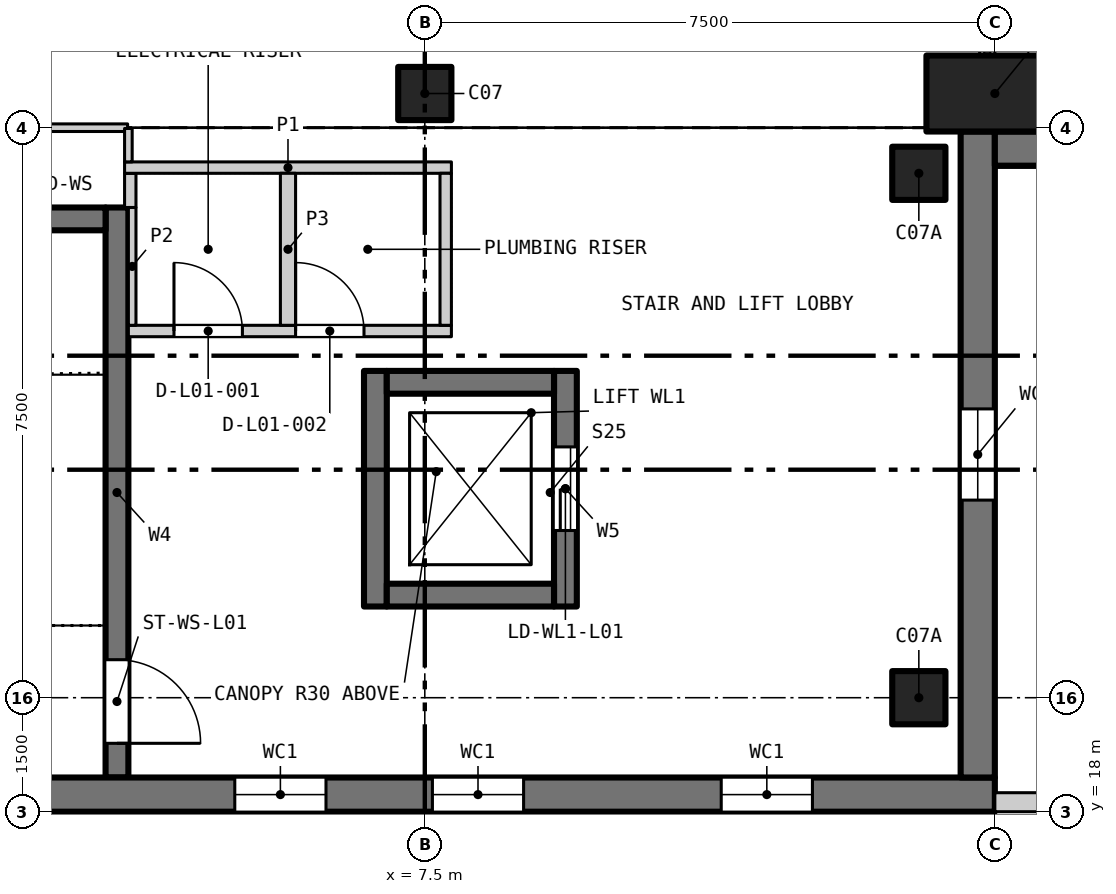
"""IFC4 building model, lengths in metres.
Left out: names, types, materials, properties, quantities, classifications, styles, units other than length and angle.
Written with IfcOpenShell. Run it as: python <this file> out.ifc"""

import sys

from ifc_helpers import new_model, si_unit, direction, frame, frame_2d, origin, origin_2d, place, context, subcontext, project, spatial, polyline, rectangle, outline, extrude, element, fill, save


model = new_model("IFC4")
c1 = context("Model", 3, precision=1e-05, world=origin(), true_north=direction((0.0, 1.0)))
c2 = subcontext(c1, "Body", "Model", "MODEL_VIEW")
j1 = project(units=[si_unit("LENGTHUNIT", "METRE"), si_unit("PLANEANGLEUNIT", "RADIAN")], contexts=[c1])
p1 = place(None, origin())
s1 = spatial("IfcSite", under=j1, at=p1, CompositionType="ELEMENT")
p2 = place(p1, origin())
s2 = spatial("IfcBuilding", under=s1, at=p2, CompositionType="ELEMENT")
p3 = place(p2, frame((0.0, 0.0, 6.0)))
s3 = spatial("IfcBuildingStorey", under=s2, at=p3, CompositionType="ELEMENT", Elevation=6.0)
for number, where, z_axis, x_axis in (
    (1, (7.5, 27.45, 0.0), (0.0, 0.0, 1.0), (1.0, 0.0, 0.0)),
    (2, (14.0, 19.5, 0.0), (0.0, 0.0, 1.0), (1.0, 0.0, 0.0)),
    (3, (14.0, 26.4, 0.0), (0.0, 0.0, 1.0), (1.0, 0.0, 0.0)),
):
    element("IfcColumn", number, at=place(p3, frame(where, z_axis=z_axis, x_axis=x_axis)), inside=s3, PredefinedType="COLUMN", context=c2, shape_type="SweptSolid", body=[
        extrude(rectangle(XDim=0.7, YDim=0.7, at=origin_2d()), origin(), (0.0, 0.0, 1.0), 3.9),
    ])
p4 = place(p3, frame((3.45, 18.45, 0.0), z_axis=(0.0, 0.0, 1.0), x_axis=(0.0, 1.0, 0.0)))
e4 = element("IfcWall", 4, at=p4, inside=s3, PredefinedType="SHEAR", context=c2, shape_type="SweptSolid", body=[
    extrude(rectangle(XDim=7.5, YDim=0.3, at=frame_2d((3.75, 0.0))), origin(), (0.0, 0.0, 1.0), 3.9),
])
p5 = place(p4, frame((0.45, 0.0, 0.0)))
e5 = element("IfcOpeningElement", 5, at=p5, cuts=e4, PredefinedType="OPENING", context=c2, shape_type="SweptSolid", body=[
    extrude(rectangle(XDim=1.1, YDim=2.1, at=frame_2d((0.55, 1.05))), frame((0.0, 0.16, 0.0), z_axis=(0.0, -1.0, 0.0), x_axis=(1.0, 0.0, 0.0)), (0.0, 0.0, 1.0), 0.32),
])
p6 = place(p3, frame((0.3, 25.8, 0.0), z_axis=(0.0, 0.0, 1.0), x_axis=(1.0, 0.0, 0.0)))
e6 = element("IfcWall", 6, at=p6, inside=s3, PredefinedType="SHEAR", context=c2, shape_type="SweptSolid", body=[
    extrude(rectangle(XDim=3.0, YDim=0.3, at=frame_2d((1.5, 0.0))), origin(), (0.0, 0.0, 1.0), 3.9),
])
p7 = place(p3, frame((6.85, 20.7, 0.0), z_axis=(0.0, 0.0, 1.0), x_axis=(0.0, 1.0, 0.0)))
e7 = element("IfcWall", 7, at=p7, inside=s3, PredefinedType="SHEAR", context=c2, shape_type="SweptSolid", body=[
    extrude(rectangle(XDim=3.1, YDim=0.3, at=frame_2d((1.55, 0.0))), origin(), (0.0, 0.0, 1.0), 3.9),
])
p8 = place(p3, frame((9.35, 20.7, 0.0), z_axis=(0.0, 0.0, 1.0), x_axis=(0.0, 1.0, 0.0)))
e8 = element("IfcWall", 8, at=p8, inside=s3, PredefinedType="SHEAR", context=c2, shape_type="SweptSolid", body=[
    extrude(rectangle(XDim=3.1, YDim=0.3, at=frame_2d((1.55, 0.0))), origin(), (0.0, 0.0, 1.0), 3.9),
])
p9 = place(p8, frame((1.0, 0.0, 0.0)))
e9 = element("IfcOpeningElement", 9, at=p9, cuts=e8, PredefinedType="OPENING", context=c2, shape_type="SweptSolid", body=[
    extrude(rectangle(XDim=1.1, YDim=2.1, at=frame_2d((0.55, 1.05))), frame((0.0, 0.16, 0.0), z_axis=(0.0, -1.0, 0.0), x_axis=(1.0, 0.0, 0.0)), (0.0, 0.0, 1.0), 0.32),
])
for number, where, z_axis, x_axis in (
    (10, (7.0, 20.85, 0.0), (0.0, 0.0, 1.0), (1.0, 0.0, 0.0)),
    (11, (7.0, 23.65, 0.0), (0.0, 0.0, 1.0), (1.0, 0.0, 0.0)),
):
    element("IfcWall", number, at=place(p3, frame(where, z_axis=z_axis, x_axis=x_axis)), inside=s3, PredefinedType="SHEAR", context=c2, shape_type="SweptSolid", body=[
        extrude(rectangle(XDim=2.2, YDim=0.3, at=frame_2d((1.1, 0.0))), origin(), (0.0, 0.0, 1.0), 3.9),
    ])
p10 = place(p3, frame((15.0, 27.45, 0.0), z_axis=(0.0, 0.0, 1.0), x_axis=(1.0, 0.0, 0.0)))
e12 = element("IfcColumn", 12, at=p10, inside=s3, PredefinedType="COLUMN", context=c2, shape_type="SweptSolid", body=[
    extrude(rectangle(XDim=1.8, YDim=1.0, at=origin_2d()), origin(), (0.0, 0.0, 1.0), 4.2),
])
p11 = place(p3, frame((43.0, 26.725, 0.0), z_axis=(0.0, 0.0, 1.0), x_axis=(-1.0, 0.0, 0.0)))
e13 = element("IfcWall", 13, at=p11, inside=s3, PredefinedType="SOLIDWALL", context=c2, shape_type="SweptSolid", body=[
    extrude(rectangle(XDim=28.0, YDim=0.45, at=frame_2d((14.0, 0.0))), origin(), (0.0, 0.0, 1.0), 1.2),
])
p12 = place(p3, frame((15.0, 18.225, 0.0), z_axis=(0.0, 0.0, 1.0), x_axis=(-1.0, 0.0, 0.0)))
e14 = element("IfcWall", 14, at=p12, inside=s3, PredefinedType="SOLIDWALL", context=c2, shape_type="SweptSolid", body=[
    extrude(rectangle(XDim=14.7, YDim=0.45, at=frame_2d((7.35, 0.0))), origin(), (0.0, 0.0, 1.0), 3.9),
])
p13 = place(p12, frame((8.8, 0.0, 0.9)))
e15 = element("IfcOpeningElement", 15, at=p13, cuts=e14, PredefinedType="OPENING", context=c2, shape_type="SweptSolid", body=[
    extrude(rectangle(XDim=1.2, YDim=1.5, at=frame_2d((0.6, 0.75))), frame((0.0, 0.235, 0.0), z_axis=(0.0, -1.0, 0.0), x_axis=(1.0, 0.0, 0.0)), (0.0, 0.0, 1.0), 0.47),
])
p14 = place(p12, frame((6.2, 0.0, 0.9)))
e16 = element("IfcOpeningElement", 16, at=p14, cuts=e14, PredefinedType="OPENING", context=c2, shape_type="SweptSolid", body=[
    extrude(rectangle(XDim=1.2, YDim=1.5, at=frame_2d((0.6, 0.75))), frame((0.0, 0.235, 0.0), z_axis=(0.0, -1.0, 0.0), x_axis=(1.0, 0.0, 0.0)), (0.0, 0.0, 1.0), 0.47),
])
p15 = place(p12, frame((2.4, 0.0, 0.9)))
e17 = element("IfcOpeningElement", 17, at=p15, cuts=e14, PredefinedType="OPENING", context=c2, shape_type="SweptSolid", body=[
    extrude(rectangle(XDim=1.2, YDim=1.5, at=frame_2d((0.6, 0.75))), frame((0.0, 0.235, 0.0), z_axis=(0.0, -1.0, 0.0), x_axis=(1.0, 0.0, 0.0)), (0.0, 0.0, 1.0), 0.47),
])
p16 = place(p3, frame((14.775, 26.95, 0.0), z_axis=(0.0, 0.0, 1.0), x_axis=(0.0, -1.0, 0.0)))
e18 = element("IfcWall", 18, at=p16, inside=s3, PredefinedType="SOLIDWALL", context=c2, shape_type="SweptSolid", body=[
    extrude(rectangle(XDim=8.5, YDim=0.45, at=frame_2d((4.25, 0.0))), origin(), (0.0, 0.0, 1.0), 3.9),
])
p17 = place(p16, frame((3.65, 0.0, 0.9)))
e19 = element("IfcOpeningElement", 19, at=p17, cuts=e18, PredefinedType="OPENING", context=c2, shape_type="SweptSolid", body=[
    extrude(rectangle(XDim=1.2, YDim=1.5, at=frame_2d((0.6, 0.75))), frame((0.0, 0.235, 0.0), z_axis=(0.0, -1.0, 0.0), x_axis=(1.0, 0.0, 0.0)), (0.0, 0.0, 1.0), 0.47),
])
p18 = place(p3, frame((43.0, 18.125, 0.0), z_axis=(0.0, 0.0, 1.0), x_axis=(-1.0, 0.0, 0.0)))
e20 = element("IfcWall", 20, at=p18, inside=s3, PredefinedType="PARAPET", context=c2, shape_type="SweptSolid", body=[
    extrude(rectangle(XDim=28.0, YDim=0.25, at=frame_2d((14.0, 0.0))), origin(), (0.0, 0.0, 1.0), 1.1),
])
p19 = place(p3, frame((15.0, 26.725, 1.2), z_axis=(0.0, 0.0, 1.0), x_axis=(1.0, 0.0, 0.0)))
e21 = element("IfcWall", 21, at=p19, inside=s3, PredefinedType="SOLIDWALL", context=c2, shape_type="SweptSolid", body=[
    extrude(outline(polyline([(0.0, 0.0), (2.65, 0.0), (2.65, 19.837), (2.55, 19.763), (0.23, 15.969), (0.0, 14.733), (0.0, 0.0)])), frame((0.0, 0.225, 0.0), z_axis=(0.0, -1.0, 0.0), x_axis=(1.0, 0.0, 0.0)), (0.0, 0.0, 1.0), 0.45),
])
p20 = place(p3, frame((3.625, 25.95, 0.0), z_axis=(0.0, 0.0, 1.0), x_axis=(0.0, 1.0, 0.0)))
e22 = element("IfcWall", 22, at=p20, inside=s3, PredefinedType="PARTITIONING", context=c2, shape_type="SweptSolid", body=[
    extrude(rectangle(XDim=0.45, YDim=0.15, at=frame_2d((0.225, 0.0))), origin(), (0.0, 0.0, 1.0), 3.9),
])
p21 = place(p3, frame((3.55, 26.475, 0.0), z_axis=(0.0, 0.0, 1.0), x_axis=(1.0, 0.0, 0.0)))
e23 = element("IfcWall", 23, at=p21, inside=s3, PredefinedType="PARTITIONING", context=c2, shape_type="SweptSolid", body=[
    extrude(rectangle(XDim=4.3, YDim=0.15, at=frame_2d((2.15, 0.0))), origin(), (0.0, 0.0, 1.0), 2.7),
])
p22 = place(p3, frame((3.6, 24.325, 0.0), z_axis=(0.0, 0.0, 1.0), x_axis=(1.0, 0.0, 0.0)))
e24 = element("IfcWall", 24, at=p22, inside=s3, PredefinedType="PARTITIONING", context=c2, shape_type="SweptSolid", body=[
    extrude(rectangle(XDim=4.25, YDim=0.15, at=frame_2d((2.125, 0.0))), origin(), (0.0, 0.0, 1.0), 3.9),
])
p23 = place(p22, frame((0.6, 0.0, 0.0)))
e25 = element("IfcOpeningElement", 25, at=p23, cuts=e24, PredefinedType="OPENING", context=c2, shape_type="SweptSolid", body=[
    extrude(rectangle(XDim=0.9, YDim=2.1, at=frame_2d((0.45, 1.05))), frame((0.0, 0.085, 0.0), z_axis=(0.0, -1.0, 0.0), x_axis=(1.0, 0.0, 0.0)), (0.0, 0.0, 1.0), 0.17),
])
p24 = place(p22, frame((2.2, 0.0, 0.0)))
e26 = element("IfcOpeningElement", 26, at=p24, cuts=e24, PredefinedType="OPENING", context=c2, shape_type="SweptSolid", body=[
    extrude(rectangle(XDim=0.9, YDim=2.1, at=frame_2d((0.45, 1.05))), frame((0.0, 0.085, 0.0), z_axis=(0.0, -1.0, 0.0), x_axis=(1.0, 0.0, 0.0)), (0.0, 0.0, 1.0), 0.17),
])
p25 = place(p3, frame((3.65, 24.4, 0.0), z_axis=(0.0, 0.0, 1.0), x_axis=(0.0, 1.0, 0.0)))
e27 = element("IfcWall", 27, at=p25, inside=s3, PredefinedType="PARTITIONING", context=c2, shape_type="SweptSolid", body=[
    extrude(rectangle(XDim=1.55, YDim=0.1, at=frame_2d((0.775, 0.0))), origin(), (0.0, 0.0, 1.0), 3.9),
])
p26 = place(p3, frame((5.7, 24.4, 0.0), z_axis=(0.0, 0.0, 1.0), x_axis=(0.0, 1.0, 0.0)))
e28 = element("IfcWall", 28, at=p26, inside=s3, PredefinedType="PARTITIONING", context=c2, shape_type="SweptSolid", body=[
    extrude(rectangle(XDim=2.0, YDim=0.2, at=frame_2d((1.0, 0.0))), origin(), (0.0, 0.0, 1.0), 3.9),
])
p27 = place(p3, frame((7.775, 24.4, 0.0), z_axis=(0.0, 0.0, 1.0), x_axis=(0.0, 1.0, 0.0)))
e29 = element("IfcWall", 29, at=p27, inside=s3, PredefinedType="PARTITIONING", context=c2, shape_type="SweptSolid", body=[
    extrude(rectangle(XDim=2.0, YDim=0.15, at=frame_2d((1.0, 0.0))), origin(), (0.0, 0.0, 1.0), 3.9),
])
p28 = place(p3, frame((0.3, 27.0, 0.0), z_axis=(0.0, 0.0, 1.0), x_axis=(1.0, 0.0, 0.0)))
e30 = element("IfcWall", 30, at=p28, inside=s3, PredefinedType="PARTITIONING", context=c2, shape_type="SweptSolid", body=[
    extrude(rectangle(XDim=3.29, YDim=0.1, at=frame_2d((1.645, 0.0))), origin(), (0.0, 0.0, 1.0), 4.0),
])
p29 = place(p3, frame((3.6, 26.55, 0.0), z_axis=(0.0, 0.0, 1.0), x_axis=(0.0, 1.0, 0.0)))
e31 = element("IfcWall", 31, at=p29, inside=s3, PredefinedType="PARTITIONING", context=c2, shape_type="SweptSolid", body=[
    extrude(rectangle(XDim=0.44, YDim=0.1, at=frame_2d((0.22, 0.0))), origin(), (0.0, 0.0, 1.0), 3.9),
])
p30 = place(p13, origin())
e32 = element("IfcWindow", 32, at=p30, inside=s3, PartitioningType="SINGLE_PANEL", PredefinedType="WINDOW", context=c2, shape_type="SweptSolid", body=[
    extrude(rectangle(XDim=1.2, YDim=1.5, at=frame_2d((0.6, 0.75))), frame((0.0, -0.075, 0.0), z_axis=(0.0, -1.0, 0.0), x_axis=(1.0, 0.0, 0.0)), (0.0, 0.0, 1.0), 0.06),
])
fill(e15, e32)
p31 = place(p14, origin())
e33 = element("IfcWindow", 33, at=p31, inside=s3, PartitioningType="SINGLE_PANEL", PredefinedType="WINDOW", context=c2, shape_type="SweptSolid", body=[
    extrude(rectangle(XDim=1.2, YDim=1.5, at=frame_2d((0.6, 0.75))), frame((0.0, -0.075, 0.0), z_axis=(0.0, -1.0, 0.0), x_axis=(1.0, 0.0, 0.0)), (0.0, 0.0, 1.0), 0.06),
])
fill(e16, e33)
p32 = place(p15, origin())
e34 = element("IfcWindow", 34, at=p32, inside=s3, PartitioningType="SINGLE_PANEL", PredefinedType="WINDOW", context=c2, shape_type="SweptSolid", body=[
    extrude(rectangle(XDim=1.2, YDim=1.5, at=frame_2d((0.6, 0.75))), frame((0.0, -0.075, 0.0), z_axis=(0.0, -1.0, 0.0), x_axis=(1.0, 0.0, 0.0)), (0.0, 0.0, 1.0), 0.06),
])
fill(e17, e34)
p33 = place(p17, origin())
e35 = element("IfcWindow", 35, at=p33, inside=s3, PartitioningType="SINGLE_PANEL", PredefinedType="WINDOW", context=c2, shape_type="SweptSolid", body=[
    extrude(rectangle(XDim=1.2, YDim=1.5, at=frame_2d((0.6, 0.75))), frame((0.0, -0.075, 0.0), z_axis=(0.0, -1.0, 0.0), x_axis=(1.0, 0.0, 0.0)), (0.0, 0.0, 1.0), 0.06),
])
fill(e19, e35)
p34 = place(p23, origin())
e36 = element("IfcDoor", 36, at=p34, inside=s3, OperationType="SINGLE_SWING_LEFT", PredefinedType="DOOR", context=c2, shape_type="SweptSolid", body=[
    extrude(rectangle(XDim=0.9, YDim=2.1, at=frame_2d((0.45, 1.05))), frame((0.0, 0.025, 0.0), z_axis=(0.0, -1.0, 0.0), x_axis=(1.0, 0.0, 0.0)), (0.0, 0.0, 1.0), 0.05),
])
fill(e25, e36)
p35 = place(p24, origin())
e37 = element("IfcDoor", 37, at=p35, inside=s3, OperationType="SINGLE_SWING_LEFT", PredefinedType="DOOR", context=c2, shape_type="SweptSolid", body=[
    extrude(rectangle(XDim=0.9, YDim=2.1, at=frame_2d((0.45, 1.05))), frame((0.0, 0.025, 0.0), z_axis=(0.0, -1.0, 0.0), x_axis=(1.0, 0.0, 0.0)), (0.0, 0.0, 1.0), 0.05),
])
fill(e26, e37)
p36 = place(p5, frame((1.1, 0.0, 0.0), z_axis=(0.0, 0.0, 1.0), x_axis=(-1.0, 0.0, 0.0)))
e38 = element("IfcDoor", 38, at=p36, inside=s3, OperationType="SINGLE_SWING_RIGHT", PredefinedType="DOOR", context=c2, shape_type="SweptSolid", body=[
    extrude(rectangle(XDim=1.1, YDim=2.1, at=frame_2d((0.55, 1.05))), frame((0.0, 0.025, 0.0), z_axis=(0.0, -1.0, 0.0), x_axis=(1.0, 0.0, 0.0)), (0.0, 0.0, 1.0), 0.05),
])
fill(e5, e38)
p37 = place(p9, origin())
e39 = element("IfcDoor", 39, at=p37, inside=s3, OperationType="SLIDING_TO_LEFT", PredefinedType="DOOR", context=c2, shape_type="SweptSolid", body=[
    extrude(rectangle(XDim=1.1, YDim=2.1, at=frame_2d((0.55, 1.05))), frame((0.0, 0.025, 0.0), z_axis=(0.0, -1.0, 0.0), x_axis=(1.0, 0.0, 0.0)), (0.0, 0.0, 1.0), 0.05),
])
fill(e9, e39)
save(model, sys.argv[1])
